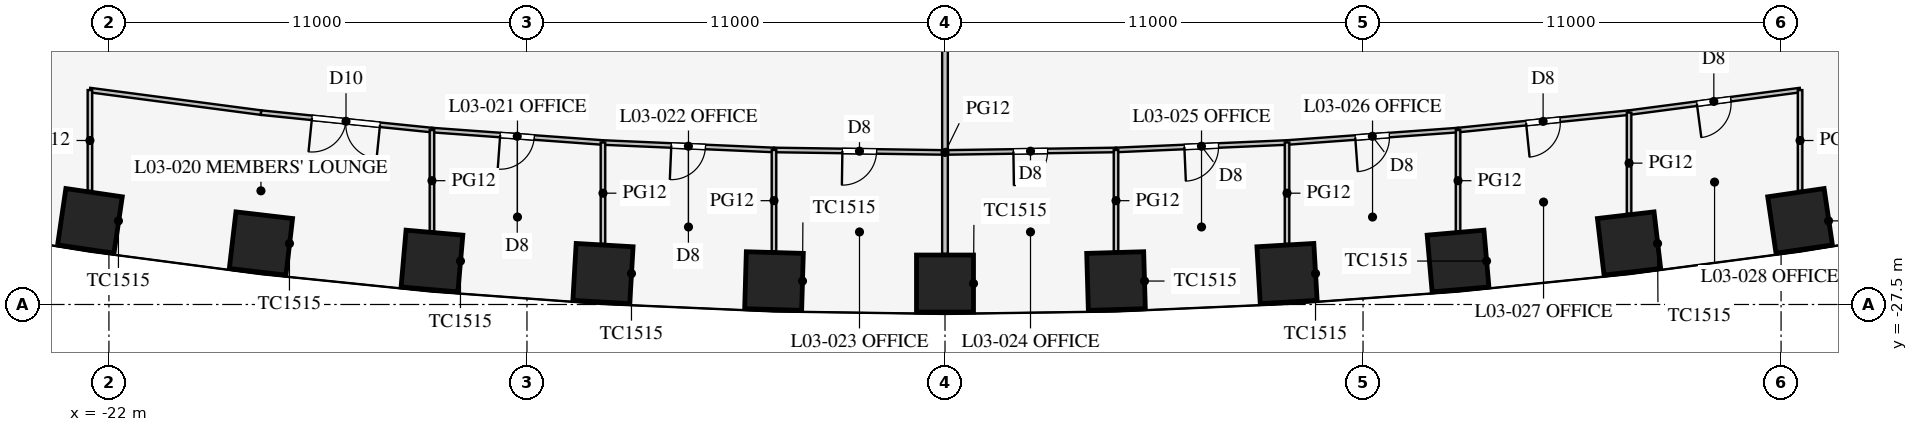
"""IFC4 building model, lengths in metres.
Left out: names, types, materials, properties, quantities, classifications, styles, units other than length and angle.
Written with IfcOpenShell. Run it as: python <this file> out.ifc"""

import sys

from ifc_helpers import new_model, si_unit, direction, frame, frame_2d, origin, origin_2d, place, context, subcontext, project, spatial, rectangle, extrude, element, fill, save


model = new_model("IFC4")
c1 = context("Model", 3, precision=1e-05, world=origin(), true_north=direction((0.0, 1.0)))
c2 = subcontext(c1, "Body", "Model", "MODEL_VIEW")
j1 = project(units=[si_unit("LENGTHUNIT", "METRE"), si_unit("PLANEANGLEUNIT", "RADIAN")], contexts=[c1])
p1 = place(None, origin())
s1 = spatial("IfcSite", under=j1, at=p1, CompositionType="ELEMENT")
p2 = place(p1, origin())
s2 = spatial("IfcBuilding", under=s1, at=p2, CompositionType="ELEMENT")
p3 = place(p2, frame((0.0, 0.0, 16.5)))
s3 = spatial("IfcBuildingStorey", under=s2, at=p3, CompositionType="ELEMENT", Elevation=16.5)
for number, where, z_axis, x_axis in (
    (1, (-22.5, -25.299, 0.0), (0.0, 0.0, 1.0), (0.989, -0.145, 0.0)),
    (2, (-18.0, -25.895, 0.0), (0.0, 0.0, 1.0), (0.993, -0.116, 0.0)),
    (3, (-13.5, -26.357, 0.0), (0.0, 0.0, 1.0), (0.996, -0.087, 0.0)),
    (4, (-9.0, -26.686, 0.0), (0.0, 0.0, 1.0), (0.998, -0.058, 0.0)),
    (5, (-4.5, -26.883, 0.0), (0.0, 0.0, 1.0), (1.0, -0.029, 0.0)),
    (6, (0.0, -26.949, 0.0), (0.0, 0.0, 1.0), (1.0, 0.0, 0.0)),
    (7, (4.5, -26.883, 0.0), (0.0, 0.0, 1.0), (1.0, 0.029, 0.0)),
    (8, (9.0, -26.686, 0.0), (0.0, 0.0, 1.0), (0.998, 0.058, 0.0)),
    (9, (13.5, -26.357, 0.0), (0.0, 0.0, 1.0), (0.996, 0.087, 0.0)),
    (10, (18.0, -25.895, 0.0), (0.0, 0.0, 1.0), (0.993, 0.116, 0.0)),
    (11, (22.5, -25.299, 0.0), (0.0, 0.0, 1.0), (0.989, 0.145, 0.0)),
):
    element("IfcColumn", number, at=place(p3, frame(where, z_axis=z_axis, x_axis=x_axis)), inside=s3, PredefinedType="COLUMN", context=c2, shape_type="SweptSolid", body=[
        extrude(rectangle(XDim=1.5, YDim=1.5, at=origin_2d()), origin(), (0.0, 0.0, 1.0), 4.2),
    ])
p4 = place(p3, frame((0.0, -13.41, 0.0), z_axis=(0.0, 0.0, 1.0), x_axis=(0.0, -1.0, 0.0)))
e12 = element("IfcWall", 12, at=p4, inside=s3, PredefinedType="PARTITIONING", context=c2, shape_type="SweptSolid", body=[
    extrude(rectangle(XDim=12.759, YDim=0.15, at=frame_2d((6.379, 0.0))), origin(), (0.0, 0.0, 1.0), 3.2),
])
p5 = place(p3, frame((0.0, -23.499, 0.0), z_axis=(0.0, 0.0, 1.0), x_axis=(0.999894311967, 0.014538393859, 0.0)))
e13 = element("IfcWall", 13, at=p5, inside=s3, PredefinedType="PARTITIONING", context=c2, shape_type="SweptSolid", body=[
    extrude(rectangle(XDim=4.5, YDim=0.12, at=frame_2d((2.25, 0.0))), origin(), (0.0, 0.0, 1.0), 2.9),
])
p6 = place(p5, frame((1.8, 0.0, 0.15)))
e14 = element("IfcOpeningElement", 14, at=p6, cuts=e13, PredefinedType="OPENING", context=c2, shape_type="SweptSolid", body=[
    extrude(rectangle(XDim=0.9, YDim=2.1, at=frame_2d((0.45, 1.05))), frame((0.0, 0.07, 0.0), z_axis=(0.0, -1.0, 0.0), x_axis=(1.0, 0.0, 0.0)), (0.0, 0.0, 1.0), 0.14),
])
p7 = place(p3, frame((13.5, -22.91, 0.0), z_axis=(0.0, 0.0, 1.0), x_axis=(0.994833141332, 0.101523499286, 0.0)))
e15 = element("IfcWall", 15, at=p7, inside=s3, PredefinedType="PARTITIONING", context=c2, shape_type="SweptSolid", body=[
    extrude(rectangle(XDim=4.523, YDim=0.12, at=frame_2d((2.262, 0.0))), origin(), (0.0, 0.0, 1.0), 2.9),
])
p8 = place(p7, frame((1.8, 0.0, 0.15)))
e16 = element("IfcOpeningElement", 16, at=p8, cuts=e15, PredefinedType="OPENING", context=c2, shape_type="SweptSolid", body=[
    extrude(rectangle(XDim=0.9, YDim=2.1, at=frame_2d((0.45, 1.05))), frame((0.0, 0.07, 0.0), z_axis=(0.0, -1.0, 0.0), x_axis=(1.0, 0.0, 0.0)), (0.0, 0.0, 1.0), 0.14),
])
p9 = place(p3, frame((18.0, -22.451, 0.0), z_axis=(0.0, 0.0, 1.0), x_axis=(0.991435244698, 0.130599217346, 0.0)))
e17 = element("IfcWall", 17, at=p9, inside=s3, PredefinedType="PARTITIONING", context=c2, shape_type="SweptSolid", body=[
    extrude(rectangle(XDim=4.539, YDim=0.12, at=frame_2d((2.27, 0.0))), origin(), (0.0, 0.0, 1.0), 2.9),
])
p10 = place(p9, frame((1.8, 0.0, 0.15)))
e18 = element("IfcOpeningElement", 18, at=p10, cuts=e17, PredefinedType="OPENING", context=c2, shape_type="SweptSolid", body=[
    extrude(rectangle(XDim=0.9, YDim=2.1, at=frame_2d((0.45, 1.05))), frame((0.0, 0.07, 0.0), z_axis=(0.0, -1.0, 0.0), x_axis=(1.0, 0.0, 0.0)), (0.0, 0.0, 1.0), 0.14),
])
p11 = place(p3, frame((4.5, -23.433, 0.0), z_axis=(0.0, 0.0, 1.0), x_axis=(0.999052370647, 0.043524254212, 0.0)))
e19 = element("IfcWall", 19, at=p11, inside=s3, PredefinedType="PARTITIONING", context=c2, shape_type="SweptSolid", body=[
    extrude(rectangle(XDim=4.504, YDim=0.12, at=frame_2d((2.252, 0.0))), origin(), (0.0, 0.0, 1.0), 2.9),
])
p12 = place(p11, frame((1.8, 0.0, 0.15)))
e20 = element("IfcOpeningElement", 20, at=p12, cuts=e19, PredefinedType="OPENING", context=c2, shape_type="SweptSolid", body=[
    extrude(rectangle(XDim=0.9, YDim=2.1, at=frame_2d((0.45, 1.05))), frame((0.0, 0.07, 0.0), z_axis=(0.0, -1.0, 0.0), x_axis=(1.0, 0.0, 0.0)), (0.0, 0.0, 1.0), 0.14),
])
p13 = place(p3, frame((9.0, -23.237, 0.0), z_axis=(0.0, 0.0, 1.0), x_axis=(0.997363894896, 0.072562119306, 0.0)))
e21 = element("IfcWall", 21, at=p13, inside=s3, PredefinedType="PARTITIONING", context=c2, shape_type="SweptSolid", body=[
    extrude(rectangle(XDim=4.512, YDim=0.12, at=frame_2d((2.256, 0.0))), origin(), (0.0, 0.0, 1.0), 2.9),
])
p14 = place(p13, frame((1.8, 0.0, 0.15)))
e22 = element("IfcOpeningElement", 22, at=p14, cuts=e21, PredefinedType="OPENING", context=c2, shape_type="SweptSolid", body=[
    extrude(rectangle(XDim=0.9, YDim=2.1, at=frame_2d((0.45, 1.05))), frame((0.0, 0.07, 0.0), z_axis=(0.0, -1.0, 0.0), x_axis=(1.0, 0.0, 0.0)), (0.0, 0.0, 1.0), 0.14),
])
p15 = place(p3, frame((-13.5, -22.91, 0.0), z_axis=(0.0, 0.0, 1.0), x_axis=(0.997363894896, -0.072562119306, 0.0)))
e23 = element("IfcWall", 23, at=p15, inside=s3, PredefinedType="PARTITIONING", context=c2, shape_type="SweptSolid", body=[
    extrude(rectangle(XDim=4.512, YDim=0.12, at=frame_2d((2.256, 0.0))), origin(), (0.0, 0.0, 1.0), 2.9),
])
p16 = place(p15, frame((1.8, 0.0, 0.15)))
e24 = element("IfcOpeningElement", 24, at=p16, cuts=e23, PredefinedType="OPENING", context=c2, shape_type="SweptSolid", body=[
    extrude(rectangle(XDim=0.9, YDim=2.1, at=frame_2d((0.45, 1.05))), frame((0.0, 0.07, 0.0), z_axis=(0.0, -1.0, 0.0), x_axis=(1.0, 0.0, 0.0)), (0.0, 0.0, 1.0), 0.14),
])
p17 = place(p3, frame((-18.0, -22.451, 0.0), z_axis=(0.0, 0.0, 1.0), x_axis=(0.994833141332, -0.101523499286, 0.0)))
e25 = element("IfcWall", 25, at=p17, inside=s3, PredefinedType="PARTITIONING", context=c2, shape_type="SweptSolid", body=[
    extrude(rectangle(XDim=4.523, YDim=0.12, at=frame_2d((2.262, 0.0))), origin(), (0.0, 0.0, 1.0), 2.9),
])
p18 = place(p17, frame((1.35, 0.0, 0.15)))
e26 = element("IfcOpeningElement", 26, at=p18, cuts=e25, PredefinedType="OPENING", context=c2, shape_type="SweptSolid", body=[
    extrude(rectangle(XDim=1.8, YDim=2.1, at=frame_2d((0.9, 1.05))), frame((0.0, 0.07, 0.0), z_axis=(0.0, -1.0, 0.0), x_axis=(1.0, 0.0, 0.0)), (0.0, 0.0, 1.0), 0.14),
])
p19 = place(p3, frame((-22.5, -21.858, 0.0), z_axis=(0.0, 0.0, 1.0), x_axis=(0.991435244698, -0.130599217346, 0.0)))
e27 = element("IfcWall", 27, at=p19, inside=s3, PredefinedType="PARTITIONING", context=c2, shape_type="SweptSolid", body=[
    extrude(rectangle(XDim=4.539, YDim=0.12, at=frame_2d((2.27, 0.0))), origin(), (0.0, 0.0, 1.0), 2.9),
])
p20 = place(p3, frame((-4.5, -23.433, 0.0), z_axis=(0.0, 0.0, 1.0), x_axis=(0.999894311967, -0.014538393859, 0.0)))
e28 = element("IfcWall", 28, at=p20, inside=s3, PredefinedType="PARTITIONING", context=c2, shape_type="SweptSolid", body=[
    extrude(rectangle(XDim=4.5, YDim=0.12, at=frame_2d((2.25, 0.0))), origin(), (0.0, 0.0, 1.0), 2.9),
])
p21 = place(p20, frame((1.8, 0.0, 0.15)))
e29 = element("IfcOpeningElement", 29, at=p21, cuts=e28, PredefinedType="OPENING", context=c2, shape_type="SweptSolid", body=[
    extrude(rectangle(XDim=0.9, YDim=2.1, at=frame_2d((0.45, 1.05))), frame((0.0, 0.07, 0.0), z_axis=(0.0, -1.0, 0.0), x_axis=(1.0, 0.0, 0.0)), (0.0, 0.0, 1.0), 0.14),
])
p22 = place(p3, frame((-9.0, -23.237, 0.0), z_axis=(0.0, 0.0, 1.0), x_axis=(0.999052370647, -0.043524254212, 0.0)))
e30 = element("IfcWall", 30, at=p22, inside=s3, PredefinedType="PARTITIONING", context=c2, shape_type="SweptSolid", body=[
    extrude(rectangle(XDim=4.504, YDim=0.12, at=frame_2d((2.252, 0.0))), origin(), (0.0, 0.0, 1.0), 2.9),
])
p23 = place(p22, frame((1.8, 0.0, 0.15)))
e31 = element("IfcOpeningElement", 31, at=p23, cuts=e30, PredefinedType="OPENING", context=c2, shape_type="SweptSolid", body=[
    extrude(rectangle(XDim=0.9, YDim=2.1, at=frame_2d((0.45, 1.05))), frame((0.0, 0.07, 0.0), z_axis=(0.0, -1.0, 0.0), x_axis=(1.0, 0.0, 0.0)), (0.0, 0.0, 1.0), 0.14),
])
p24 = place(p3, frame((13.5, -22.91, 0.0), z_axis=(0.0, 0.0, 1.0), x_axis=(0.0, -1.0, 0.0)))
e32 = element("IfcWall", 32, at=p24, inside=s3, PredefinedType="PARTITIONING", context=c2, shape_type="SweptSolid", body=[
    extrude(rectangle(XDim=2.664, YDim=0.12, at=frame_2d((1.332, 0.0))), origin(), (0.0, 0.0, 1.0), 2.9),
])
p25 = place(p3, frame((18.0, -22.451, 0.0), z_axis=(0.0, 0.0, 1.0), x_axis=(0.0, -1.0, 0.0)))
e33 = element("IfcWall", 33, at=p25, inside=s3, PredefinedType="PARTITIONING", context=c2, shape_type="SweptSolid", body=[
    extrude(rectangle(XDim=2.659, YDim=0.12, at=frame_2d((1.33, 0.0))), origin(), (0.0, 0.0, 1.0), 2.9),
])
p26 = place(p3, frame((22.5, -21.858, 0.0), z_axis=(0.0, 0.0, 1.0), x_axis=(0.0, -1.0, 0.0)))
e34 = element("IfcWall", 34, at=p26, inside=s3, PredefinedType="PARTITIONING", context=c2, shape_type="SweptSolid", body=[
    extrude(rectangle(XDim=2.653, YDim=0.12, at=frame_2d((1.327, 0.0))), origin(), (0.0, 0.0, 1.0), 2.9),
])
p27 = place(p3, frame((4.5, -23.433, 0.0), z_axis=(0.0, 0.0, 1.0), x_axis=(0.0, -1.0, 0.0)))
e35 = element("IfcWall", 35, at=p27, inside=s3, PredefinedType="PARTITIONING", context=c2, shape_type="SweptSolid", body=[
    extrude(rectangle(XDim=2.669, YDim=0.12, at=frame_2d((1.335, 0.0))), origin(), (0.0, 0.0, 1.0), 2.9),
])
p28 = place(p3, frame((9.0, -23.237, 0.0), z_axis=(0.0, 0.0, 1.0), x_axis=(0.0, -1.0, 0.0)))
e36 = element("IfcWall", 36, at=p28, inside=s3, PredefinedType="PARTITIONING", context=c2, shape_type="SweptSolid", body=[
    extrude(rectangle(XDim=2.667, YDim=0.12, at=frame_2d((1.334, 0.0))), origin(), (0.0, 0.0, 1.0), 2.9),
])
p29 = place(p3, frame((-13.5, -22.91, 0.0), z_axis=(0.0, 0.0, 1.0), x_axis=(0.0, -1.0, 0.0)))
e37 = element("IfcWall", 37, at=p29, inside=s3, PredefinedType="PARTITIONING", context=c2, shape_type="SweptSolid", body=[
    extrude(rectangle(XDim=2.664, YDim=0.12, at=frame_2d((1.332, 0.0))), origin(), (0.0, 0.0, 1.0), 2.9),
])
p30 = place(p3, frame((-22.5, -21.858, 0.0), z_axis=(0.0, 0.0, 1.0), x_axis=(0.0, -1.0, 0.0)))
e38 = element("IfcWall", 38, at=p30, inside=s3, PredefinedType="PARTITIONING", context=c2, shape_type="SweptSolid", body=[
    extrude(rectangle(XDim=2.653, YDim=0.12, at=frame_2d((1.327, 0.0))), origin(), (0.0, 0.0, 1.0), 2.9),
])
p31 = place(p3, frame((-4.5, -23.433, 0.0), z_axis=(0.0, 0.0, 1.0), x_axis=(0.0, -1.0, 0.0)))
e39 = element("IfcWall", 39, at=p31, inside=s3, PredefinedType="PARTITIONING", context=c2, shape_type="SweptSolid", body=[
    extrude(rectangle(XDim=2.669, YDim=0.12, at=frame_2d((1.335, 0.0))), origin(), (0.0, 0.0, 1.0), 2.9),
])
p32 = place(p3, frame((-9.0, -23.237, 0.0), z_axis=(0.0, 0.0, 1.0), x_axis=(0.0, -1.0, 0.0)))
e40 = element("IfcWall", 40, at=p32, inside=s3, PredefinedType="PARTITIONING", context=c2, shape_type="SweptSolid", body=[
    extrude(rectangle(XDim=2.667, YDim=0.12, at=frame_2d((1.334, 0.0))), origin(), (0.0, 0.0, 1.0), 2.9),
])
p33 = place(p18, frame((1.8, 0.0, 0.0), z_axis=(0.0, 0.0, 1.0), x_axis=(-1.0, 0.0, 0.0)))
e41 = element("IfcDoor", 41, at=p33, inside=s3, OperationType="DOUBLE_DOOR_SINGLE_SWING", PredefinedType="DOOR", context=c2, shape_type="SweptSolid", body=[
    extrude(rectangle(XDim=1.8, YDim=2.1, at=frame_2d((0.9, 1.05))), frame((0.0, 0.025, 0.0), z_axis=(0.0, -1.0, 0.0), x_axis=(1.0, 0.0, 0.0)), (0.0, 0.0, 1.0), 0.05),
])
fill(e26, e41)
p34 = place(p16, frame((0.9, 0.0, 0.0), z_axis=(0.0, 0.0, 1.0), x_axis=(-1.0, 0.0, 0.0)))
e42 = element("IfcDoor", 42, at=p34, inside=s3, OperationType="SINGLE_SWING_RIGHT", PredefinedType="DOOR", context=c2, shape_type="SweptSolid", body=[
    extrude(rectangle(XDim=0.9, YDim=2.1, at=frame_2d((0.45, 1.05))), frame((0.0, 0.025, 0.0), z_axis=(0.0, -1.0, 0.0), x_axis=(1.0, 0.0, 0.0)), (0.0, 0.0, 1.0), 0.05),
])
fill(e24, e42)
p35 = place(p23, frame((0.9, 0.0, 0.0), z_axis=(0.0, 0.0, 1.0), x_axis=(-1.0, 0.0, 0.0)))
e43 = element("IfcDoor", 43, at=p35, inside=s3, OperationType="SINGLE_SWING_RIGHT", PredefinedType="DOOR", context=c2, shape_type="SweptSolid", body=[
    extrude(rectangle(XDim=0.9, YDim=2.1, at=frame_2d((0.45, 1.05))), frame((0.0, 0.025, 0.0), z_axis=(0.0, -1.0, 0.0), x_axis=(1.0, 0.0, 0.0)), (0.0, 0.0, 1.0), 0.05),
])
fill(e31, e43)
p36 = place(p21, frame((0.9, 0.0, 0.0), z_axis=(0.0, 0.0, 1.0), x_axis=(-1.0, 0.0, 0.0)))
e44 = element("IfcDoor", 44, at=p36, inside=s3, OperationType="SINGLE_SWING_RIGHT", PredefinedType="DOOR", context=c2, shape_type="SweptSolid", body=[
    extrude(rectangle(XDim=0.9, YDim=2.1, at=frame_2d((0.45, 1.05))), frame((0.0, 0.025, 0.0), z_axis=(0.0, -1.0, 0.0), x_axis=(1.0, 0.0, 0.0)), (0.0, 0.0, 1.0), 0.05),
])
fill(e29, e44)
p37 = place(p6, frame((0.9, 0.0, 0.0), z_axis=(0.0, 0.0, 1.0), x_axis=(-1.0, 0.0, 0.0)))
e45 = element("IfcDoor", 45, at=p37, inside=s3, OperationType="SINGLE_SWING_RIGHT", PredefinedType="DOOR", context=c2, shape_type="SweptSolid", body=[
    extrude(rectangle(XDim=0.9, YDim=2.1, at=frame_2d((0.45, 1.05))), frame((0.0, 0.025, 0.0), z_axis=(0.0, -1.0, 0.0), x_axis=(1.0, 0.0, 0.0)), (0.0, 0.0, 1.0), 0.05),
])
fill(e14, e45)
p38 = place(p12, frame((0.9, 0.0, 0.0), z_axis=(0.0, 0.0, 1.0), x_axis=(-1.0, 0.0, 0.0)))
e46 = element("IfcDoor", 46, at=p38, inside=s3, OperationType="SINGLE_SWING_RIGHT", PredefinedType="DOOR", context=c2, shape_type="SweptSolid", body=[
    extrude(rectangle(XDim=0.9, YDim=2.1, at=frame_2d((0.45, 1.05))), frame((0.0, 0.025, 0.0), z_axis=(0.0, -1.0, 0.0), x_axis=(1.0, 0.0, 0.0)), (0.0, 0.0, 1.0), 0.05),
])
fill(e20, e46)
p39 = place(p14, frame((0.9, 0.0, 0.0), z_axis=(0.0, 0.0, 1.0), x_axis=(-1.0, 0.0, 0.0)))
e47 = element("IfcDoor", 47, at=p39, inside=s3, OperationType="SINGLE_SWING_RIGHT", PredefinedType="DOOR", context=c2, shape_type="SweptSolid", body=[
    extrude(rectangle(XDim=0.9, YDim=2.1, at=frame_2d((0.45, 1.05))), frame((0.0, 0.025, 0.0), z_axis=(0.0, -1.0, 0.0), x_axis=(1.0, 0.0, 0.0)), (0.0, 0.0, 1.0), 0.05),
])
fill(e22, e47)
p40 = place(p8, frame((0.9, 0.0, 0.0), z_axis=(0.0, 0.0, 1.0), x_axis=(-1.0, 0.0, 0.0)))
e48 = element("IfcDoor", 48, at=p40, inside=s3, OperationType="SINGLE_SWING_RIGHT", PredefinedType="DOOR", context=c2, shape_type="SweptSolid", body=[
    extrude(rectangle(XDim=0.9, YDim=2.1, at=frame_2d((0.45, 1.05))), frame((0.0, 0.025, 0.0), z_axis=(0.0, -1.0, 0.0), x_axis=(1.0, 0.0, 0.0)), (0.0, 0.0, 1.0), 0.05),
])
fill(e16, e48)
p41 = place(p10, frame((0.9, 0.0, 0.0), z_axis=(0.0, 0.0, 1.0), x_axis=(-1.0, 0.0, 0.0)))
e49 = element("IfcDoor", 49, at=p41, inside=s3, OperationType="SINGLE_SWING_RIGHT", PredefinedType="DOOR", context=c2, shape_type="SweptSolid", body=[
    extrude(rectangle(XDim=0.9, YDim=2.1, at=frame_2d((0.45, 1.05))), frame((0.0, 0.025, 0.0), z_axis=(0.0, -1.0, 0.0), x_axis=(1.0, 0.0, 0.0)), (0.0, 0.0, 1.0), 0.05),
])
fill(e18, e49)
save(model, sys.argv[1])
